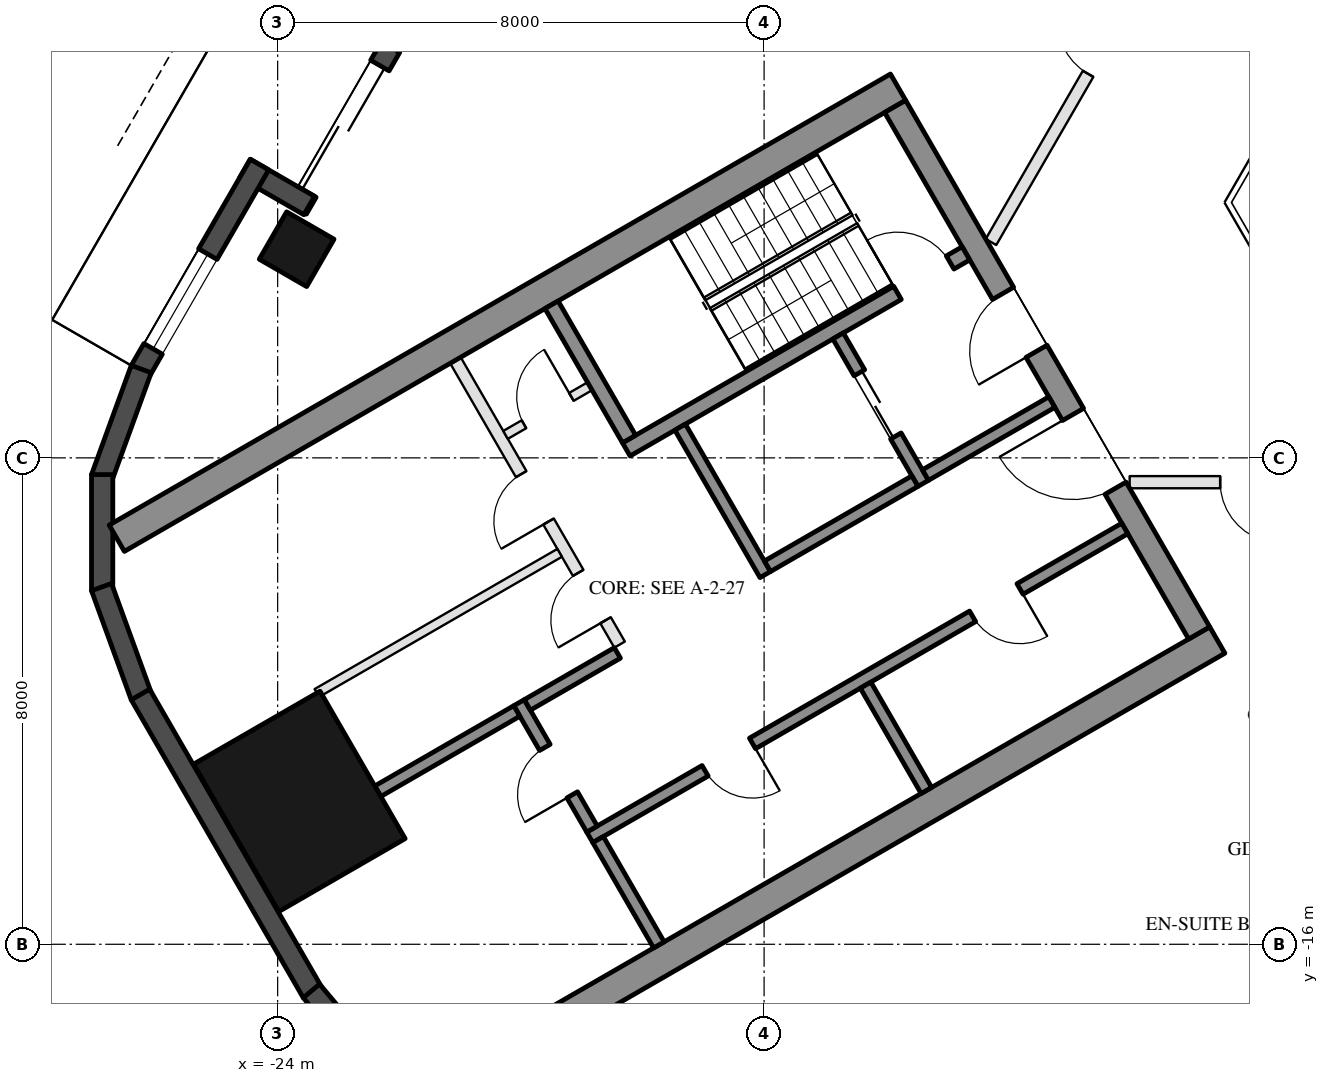
"""IFC4 building model, lengths in metres.
Left out: names, types, materials, properties, quantities, classifications, styles, units other than length and angle.
Written with IfcOpenShell. Run it as: python <this file> out.ifc"""

import sys

from ifc_helpers import new_model, si_unit, direction, frame, frame_2d, origin, origin_2d, place, context, subcontext, project, spatial, rectangle, hollow_rectangle, extrude, element, fill, save


model = new_model("IFC4")
c1 = context("Model", 3, precision=1e-05, world=origin(), true_north=direction((0.0, 1.0)))
c2 = subcontext(c1, "Body", "Model", "MODEL_VIEW")
j1 = project(units=[si_unit("LENGTHUNIT", "METRE"), si_unit("PLANEANGLEUNIT", "RADIAN")], contexts=[c1])
p1 = place(None, origin())
s1 = spatial("IfcSite", under=j1, at=p1, CompositionType="ELEMENT")
p2 = place(p1, origin())
s2 = spatial("IfcBuilding", under=s1, at=p2, CompositionType="ELEMENT")
p3 = place(p2, frame((0.0, 0.0, 120.5)))
s3 = spatial("IfcBuildingStorey", under=s2, at=p3, CompositionType="ELEMENT", Elevation=120.5)
p4 = place(p3, frame((-23.688, -4.568, 0.0), z_axis=(0.0, 0.0, 1.0), x_axis=(0.5, 0.866025403784, 0.0)))
e1 = element("IfcColumn", 1, at=p4, inside=s3, PredefinedType="COLUMN", context=c2, shape_type="SweptSolid", body=[
    extrude(hollow_rectangle(XDim=0.9, YDim=0.9, WallThickness=0.04, at=origin_2d()), origin(), (0.0, 0.0, 1.0), 3.7),
])
p5 = place(p3, frame((-23.643, -13.65, 0.0), z_axis=(0.0, 0.0, 1.0), x_axis=(-0.5, 0.866025403784, 0.0)))
e2 = element("IfcColumn", 2, at=p5, inside=s3, PredefinedType="COLUMN", context=c2, shape_type="SweptSolid", body=[
    extrude(hollow_rectangle(XDim=2.8, YDim=2.4, WallThickness=0.07, at=origin_2d()), origin(), (0.0, 0.0, 1.0), 3.7),
])
p6 = place(p3, frame((-20.309, 1.934, 0.0), z_axis=(0.0, 0.0, 1.0), x_axis=(-0.499992114976, -0.866029956157, 0.0)))
e3 = element("IfcWall", 3, at=p6, inside=s3, PredefinedType="SOLIDWALL", context=c2, shape_type="SweptSolid", body=[
    extrude(rectangle(XDim=6.74, YDim=0.35, at=frame_2d((3.37, 0.0))), origin(), (0.0, 0.0, 1.0), 3.55),
])
p7 = place(p6, frame((4.02, 0.0, 0.0)))
e4 = element("IfcOpeningElement", 4, at=p7, cuts=e3, PredefinedType="OPENING", context=c2, shape_type="SweptSolid", body=[
    extrude(rectangle(XDim=2.4, YDim=2.4, at=frame_2d((1.2, 1.2))), frame((0.0, 0.185, 0.0), z_axis=(0.0, -1.0, 0.0), x_axis=(1.0, 0.0, 0.0)), (0.0, 0.0, 1.0), 0.37),
])
p8 = place(p6, frame((0.77, 0.0, 0.3)))
e5 = element("IfcOpeningElement", 5, at=p8, cuts=e3, PredefinedType="OPENING", context=c2, shape_type="SweptSolid", body=[
    extrude(rectangle(XDim=2.9, YDim=2.65, at=frame_2d((1.45, 1.325))), frame((0.0, 0.185, 0.0), z_axis=(0.0, -1.0, 0.0), x_axis=(1.0, 0.0, 0.0)), (0.0, 0.0, 1.0), 0.37),
])
p9 = place(p3, frame((-23.481, -3.85, 0.0), z_axis=(0.0, 0.0, 1.0), x_axis=(-0.866092288191, 0.499884134912, 0.0)))
e6 = element("IfcWall", 6, at=p9, inside=s3, PredefinedType="SOLIDWALL", context=c2, shape_type="SweptSolid", body=[
    extrude(rectangle(XDim=1.22, YDim=0.35, at=frame_2d((0.61, 0.0))), origin(), (0.0, 0.0, 1.0), 3.55),
])
p10 = place(p3, frame((-24.299, -3.176, 0.0), z_axis=(0.0, 0.0, 1.0), x_axis=(-0.500028278809, -0.866009076391, 0.0)))
e7 = element("IfcWall", 7, at=p10, inside=s3, PredefinedType="SOLIDWALL", context=c2, shape_type="SweptSolid", body=[
    extrude(rectangle(XDim=3.916, YDim=0.35, at=frame_2d((1.958, 0.0))), origin(), (0.0, 0.0, 1.0), 3.55),
])
p11 = place(p10, frame((1.7, 0.0, 0.3)))
e8 = element("IfcOpeningElement", 8, at=p11, cuts=e7, PredefinedType="OPENING", context=c2, shape_type="SweptSolid", body=[
    extrude(rectangle(XDim=1.8, YDim=2.65, at=frame_2d((0.9, 1.325))), frame((0.0, 0.185, 0.0), z_axis=(0.0, -1.0, 0.0), x_axis=(1.0, 0.0, 0.0)), (0.0, 0.0, 1.0), 0.37),
])
for number, where, z_axis, x_axis in (
    (9, (-26.244, -6.54, 0.0), (0.0, 0.0, 1.0), (-0.342, -0.94, 0.0)),
    (10, (-26.886, -8.275, 0.0), (0.0, 0.0, 1.0), (0.0, -1.0, 0.0)),
    (11, (-26.897, -10.125, 0.0), (0.0, 0.0, 1.0), (0.342, -0.94, 0.0)),
):
    element("IfcWall", number, at=place(p3, frame(where, z_axis=z_axis, x_axis=x_axis)), inside=s3, PredefinedType="SOLIDWALL", context=c2, shape_type="SweptSolid", body=[
        extrude(rectangle(XDim=1.91, YDim=0.35, at=frame_2d((0.955, 0.0))), origin(), (0.0, 0.0, 1.0), 3.55),
    ])
p12 = place(p3, frame((-26.257, -11.893, 0.0), z_axis=(0.0, 0.0, 1.0), x_axis=(0.500018773155, -0.866014564827, 0.0)))
e12 = element("IfcWall", 12, at=p12, inside=s3, PredefinedType="SOLIDWALL", context=c2, shape_type="SweptSolid", body=[
    extrude(rectangle(XDim=5.658, YDim=0.35, at=frame_2d((2.829, 0.0))), origin(), (0.0, 0.0, 1.0), 3.55),
])
p13 = place(p3, frame((-23.445, -16.768, 0.0), z_axis=(0.0, 0.0, 1.0), x_axis=(0.642733291068, -0.76609001857, 0.0)))
e13 = element("IfcWall", 13, at=p13, inside=s3, PredefinedType="SOLIDWALL", context=c2, shape_type="SweptSolid", body=[
    extrude(rectangle(XDim=1.91, YDim=0.35, at=frame_2d((0.955, 0.0))), origin(), (0.0, 0.0, 1.0), 3.55),
])
for number, where, z_axis, x_axis in (
    (14, (-13.797, -1.903, 0.0), (0.0, 0.0, 1.0), (-0.866, -0.5, 0.0)),
    (15, (-8.547, -10.997, 0.0), (0.0, 0.0, 1.0), (-0.866, -0.5, 0.0)),
):
    element("IfcWall", number, at=place(p3, frame(where, z_axis=z_axis, x_axis=x_axis)), inside=s3, PredefinedType="SHEAR", context=c2, shape_type="SweptSolid", body=[
        extrude(rectangle(XDim=14.837, YDim=0.5, at=frame_2d((7.418, 0.0))), origin(), (0.0, 0.0, 1.0), 3.5),
    ])
p14 = place(p3, frame((-13.845, -2.22, 0.0), z_axis=(0.0, 0.0, 1.0), x_axis=(0.500004234368, -0.866022959057, 0.0)))
e16 = element("IfcWall", 16, at=p14, inside=s3, PredefinedType="SHEAR", context=c2, shape_type="SweptSolid", body=[
    extrude(rectangle(XDim=10.0, YDim=0.4, at=frame_2d((5.0, 0.0))), origin(), (0.0, 0.0, 1.0), 3.5),
])
p15 = place(p14, frame((3.55, 0.0, 0.0)))
e17 = element("IfcOpeningElement", 17, at=p15, cuts=e16, PredefinedType="OPENING", context=c2, shape_type="SweptSolid", body=[
    extrude(rectangle(XDim=1.1, YDim=2.1, at=frame_2d((0.55, 1.05))), frame((0.0, 0.21, 0.0), z_axis=(0.0, -1.0, 0.0), x_axis=(1.0, 0.0, 0.0)), (0.0, 0.0, 1.0), 0.42),
])
p16 = place(p14, frame((5.85, 0.0, 0.0)))
e18 = element("IfcOpeningElement", 18, at=p16, cuts=e16, PredefinedType="OPENING", context=c2, shape_type="SweptSolid", body=[
    extrude(rectangle(XDim=1.4, YDim=2.1, at=frame_2d((0.7, 1.05))), frame((0.0, 0.21, 0.0), z_axis=(0.0, -1.0, 0.0), x_axis=(1.0, 0.0, 0.0)), (0.0, 0.0, 1.0), 0.42),
])
p17 = place(p3, frame((-12.681, -4.636, 0.0), z_axis=(0.0, 0.0, 1.0), x_axis=(-0.866021702275, -0.500006411147, 0.0)))
e19 = element("IfcWall", 19, at=p17, inside=s3, PredefinedType="SHEAR", context=c2, shape_type="SweptSolid", body=[
    extrude(rectangle(XDim=6.45, YDim=0.25, at=frame_2d((3.225, 0.0))), origin(), (0.0, 0.0, 1.0), 3.5),
])
p18 = place(p17, frame((0.3, 0.0, 0.0)))
e20 = element("IfcOpeningElement", 20, at=p18, cuts=e19, PredefinedType="OPENING", context=c2, shape_type="SweptSolid", body=[
    extrude(rectangle(XDim=1.0, YDim=2.1, at=frame_2d((0.5, 1.05))), frame((0.0, 0.135, 0.0), z_axis=(0.0, -1.0, 0.0), x_axis=(1.0, 0.0, 0.0)), (0.0, 0.0, 1.0), 0.27),
])
p19 = place(p3, frame((-19.496, -5.482, 0.0), z_axis=(0.0, 0.0, 1.0), x_axis=(0.499990435942, -0.866030925526, 0.0)))
e21 = element("IfcWall", 21, at=p19, inside=s3, PredefinedType="SHEAR", context=c2, shape_type="SweptSolid", body=[
    extrude(rectangle(XDim=2.55, YDim=0.25, at=frame_2d((1.275, 0.0))), origin(), (0.0, 0.0, 1.0), 3.5),
])
p20 = place(p3, frame((-17.381, -7.495, 0.0), z_axis=(0.0, 0.0, 1.0), x_axis=(0.500011755427, -0.866018616679, 0.0)))
e22 = element("IfcWall", 22, at=p20, inside=s3, PredefinedType="SHEAR", context=c2, shape_type="SweptSolid", body=[
    extrude(rectangle(XDim=2.8, YDim=0.2, at=frame_2d((1.4, 0.0))), origin(), (0.0, 0.0, 1.0), 3.5),
])
p21 = place(p3, frame((-14.783, -5.995, 0.0), z_axis=(0.0, 0.0, 1.0), x_axis=(0.49994636267, -0.866056369097, 0.0)))
e23 = element("IfcWall", 23, at=p21, inside=s3, PredefinedType="SHEAR", context=c2, shape_type="SweptSolid", body=[
    extrude(rectangle(XDim=2.8, YDim=0.2, at=frame_2d((1.4, 0.0))), origin(), (0.0, 0.0, 1.0), 3.5),
])
p22 = place(p21, frame((0.7, 0.0, 0.0)))
e24 = element("IfcOpeningElement", 24, at=p22, cuts=e23, PredefinedType="OPENING", context=c2, shape_type="SweptSolid", body=[
    extrude(rectangle(XDim=1.2, YDim=2.1, at=frame_2d((0.6, 1.05))), frame((0.0, 0.11, 0.0), z_axis=(0.0, -1.0, 0.0), x_axis=(1.0, 0.0, 0.0)), (0.0, 0.0, 1.0), 0.22),
])
p23 = place(p3, frame((-13.52, -8.383, 0.0), z_axis=(0.0, 0.0, 1.0), x_axis=(-0.866034573852, -0.49998411664, 0.0)))
e25 = element("IfcWall", 25, at=p23, inside=s3, PredefinedType="SHEAR", context=c2, shape_type="SweptSolid", body=[
    extrude(rectangle(XDim=2.8, YDim=0.2, at=frame_2d((1.4, 0.0))), origin(), (0.0, 0.0, 1.0), 3.5),
])
p24 = place(p3, frame((-11.268, -7.083, 0.0), z_axis=(0.0, 0.0, 1.0), x_axis=(-0.866050077142, -0.499957262057, 0.0)))
e26 = element("IfcWall", 26, at=p24, inside=s3, PredefinedType="SHEAR", context=c2, shape_type="SweptSolid", body=[
    extrude(rectangle(XDim=2.4, YDim=0.2, at=frame_2d((1.2, 0.0))), origin(), (0.0, 0.0, 1.0), 3.5),
])
p25 = place(p3, frame((-10.068, -9.162, 0.0), z_axis=(0.0, 0.0, 1.0), x_axis=(-0.866032725843, -0.499987317609, 0.0)))
e27 = element("IfcWall", 27, at=p25, inside=s3, PredefinedType="SHEAR", context=c2, shape_type="SweptSolid", body=[
    extrude(rectangle(XDim=10.16, YDim=0.2, at=frame_2d((5.08, 0.0))), origin(), (0.0, 0.0, 1.0), 3.5),
])
p26 = place(p25, frame((1.99, 0.0, 0.0)))
e28 = element("IfcOpeningElement", 28, at=p26, cuts=e27, PredefinedType="OPENING", context=c2, shape_type="SweptSolid", body=[
    extrude(rectangle(XDim=0.9, YDim=2.1, at=frame_2d((0.45, 1.05))), frame((0.0, 0.11, 0.0), z_axis=(0.0, -1.0, 0.0), x_axis=(1.0, 0.0, 0.0)), (0.0, 0.0, 1.0), 0.22),
])
p27 = place(p25, frame((7.07, 0.0, 0.0)))
e29 = element("IfcOpeningElement", 29, at=p27, cuts=e27, PredefinedType="OPENING", context=c2, shape_type="SweptSolid", body=[
    extrude(rectangle(XDim=0.9, YDim=2.1, at=frame_2d((0.45, 1.05))), frame((0.0, 0.11, 0.0), z_axis=(0.0, -1.0, 0.0), x_axis=(1.0, 0.0, 0.0)), (0.0, 0.0, 1.0), 0.22),
])
p28 = place(p3, frame((-20.031, -12.026, 0.0), z_axis=(0.0, 0.0, 1.0), x_axis=(0.500033551112, -0.866006032174, 0.0)))
e30 = element("IfcWall", 30, at=p28, inside=s3, PredefinedType="SHEAR", context=c2, shape_type="SweptSolid", body=[
    extrude(rectangle(XDim=2.4, YDim=0.2, at=frame_2d((1.2, 0.0))), origin(), (0.0, 0.0, 1.0), 3.5),
])
p29 = place(p28, frame((0.85, 0.0, 0.0)))
e31 = element("IfcOpeningElement", 31, at=p29, cuts=e30, PredefinedType="OPENING", context=c2, shape_type="SweptSolid", body=[
    extrude(rectangle(XDim=0.9, YDim=2.1, at=frame_2d((0.45, 1.05))), frame((0.0, 0.11, 0.0), z_axis=(0.0, -1.0, 0.0), x_axis=(1.0, 0.0, 0.0)), (0.0, 0.0, 1.0), 0.22),
])
p30 = place(p3, frame((-18.413, -11.208, 0.0), z_axis=(0.0, 0.0, 1.0), x_axis=(-0.866038183914, -0.499977863513, 0.0)))
e32 = element("IfcWall", 32, at=p30, inside=s3, PredefinedType="SHEAR", context=c2, shape_type="SweptSolid", body=[
    extrude(rectangle(XDim=1.71, YDim=0.2, at=frame_2d((0.855, 0.0))), origin(), (0.0, 0.0, 1.0), 3.5),
])
for number, where, z_axis, x_axis in (
    (33, (-14.331, -11.738, 0.0), (0.0, 0.0, 1.0), (0.5, -0.866, 0.0)),
    (34, (-18.73, -14.278, 0.0), (0.0, 0.0, 1.0), (0.5, -0.866, 0.0)),
):
    element("IfcWall", number, at=place(p3, frame(where, z_axis=z_axis, x_axis=x_axis)), inside=s3, PredefinedType="SHEAR", context=c2, shape_type="SweptSolid", body=[
        extrude(rectangle(XDim=2.0, YDim=0.2, at=frame_2d((1.0, 0.0))), origin(), (0.0, 0.0, 1.0), 3.5),
    ])
p31 = place(p3, frame((-20.067, -12.163, 0.0), z_axis=(0.0, 0.0, 1.0), x_axis=(-0.866060851709, -0.499938597367, 0.0)))
e35 = element("IfcWall", 35, at=p31, inside=s3, PredefinedType="SHEAR", context=c2, shape_type="SweptSolid", body=[
    extrude(rectangle(XDim=2.64, YDim=0.2, at=frame_2d((1.32, 0.0))), origin(), (0.0, 0.0, 1.0), 3.5),
])
p32 = place(p3, frame((-21.076, -6.395, 0.0), z_axis=(0.0, 0.0, 1.0), x_axis=(0.50001468107, -0.866016927499, 0.0)))
e36 = element("IfcWall", 36, at=p32, inside=s3, PredefinedType="PARTITIONING", context=c2, shape_type="SweptSolid", body=[
    extrude(rectangle(XDim=5.4, YDim=0.2, at=frame_2d((2.7, 0.0))), origin(), (0.0, 0.0, 1.0), 3.5),
])
p33 = place(p32, frame((2.163, 0.0, 0.0)))
e37 = element("IfcOpeningElement", 37, at=p33, cuts=e36, PredefinedType="OPENING", context=c2, shape_type="SweptSolid", body=[
    extrude(rectangle(XDim=0.9, YDim=2.1, at=frame_2d((0.45, 1.05))), frame((0.0, 0.11, 0.0), z_axis=(0.0, -1.0, 0.0), x_axis=(1.0, 0.0, 0.0)), (0.0, 0.0, 1.0), 0.22),
])
p34 = place(p32, frame((4.038, 0.0, 0.0)))
e38 = element("IfcOpeningElement", 38, at=p34, cuts=e36, PredefinedType="OPENING", context=c2, shape_type="SweptSolid", body=[
    extrude(rectangle(XDim=0.9, YDim=2.1, at=frame_2d((0.45, 1.05))), frame((0.0, 0.11, 0.0), z_axis=(0.0, -1.0, 0.0), x_axis=(1.0, 0.0, 0.0)), (0.0, 0.0, 1.0), 0.22),
])
p35 = place(p3, frame((-18.866, -6.822, 0.0), z_axis=(0.0, 0.0, 1.0), x_axis=(-0.866028054938, -0.499995408039, 0.0)))
e39 = element("IfcWall", 39, at=p35, inside=s3, PredefinedType="PARTITIONING", context=c2, shape_type="SweptSolid", body=[
    extrude(rectangle(XDim=1.6, YDim=0.15, at=frame_2d((0.8, 0.0))), origin(), (0.0, 0.0, 1.0), 3.5),
])
p36 = place(p35, frame((0.35, 0.0, 0.0)))
e40 = element("IfcOpeningElement", 40, at=p36, cuts=e39, PredefinedType="OPENING", context=c2, shape_type="SweptSolid", body=[
    extrude(rectangle(XDim=0.9, YDim=2.1, at=frame_2d((0.45, 1.05))), frame((0.0, 0.085, 0.0), z_axis=(0.0, -1.0, 0.0), x_axis=(1.0, 0.0, 0.0)), (0.0, 0.0, 1.0), 0.17),
])
p37 = place(p3, frame((-19.363, -9.562, 0.0), z_axis=(0.0, 0.0, 1.0), x_axis=(-0.86601185002, -0.500023475074, 0.0)))
e41 = element("IfcWall", 41, at=p37, inside=s3, PredefinedType="PARTITIONING", context=c2, shape_type="SweptSolid", body=[
    extrude(rectangle(XDim=4.61, YDim=0.15, at=frame_2d((2.305, 0.0))), origin(), (0.0, 0.0, 1.0), 3.5),
])
p38 = place(p3, frame((-6.011, -8.4, 0.0), z_axis=(0.0, 0.0, 1.0), x_axis=(-1.0, 0.0, 0.0)))
e42 = element("IfcWall", 42, at=p38, inside=s3, PredefinedType="PARTITIONING", context=c2, shape_type="SweptSolid", body=[
    extrude(rectangle(XDim=3.977, YDim=0.2, at=frame_2d((1.988, 0.0))), origin(), (0.0, 0.0, 1.0), 2.95),
])
p39 = place(p38, frame((1.488, 0.0, 0.0)))
e43 = element("IfcOpeningElement", 43, at=p39, cuts=e42, PredefinedType="OPENING", context=c2, shape_type="SweptSolid", body=[
    extrude(rectangle(XDim=1.0, YDim=2.1, at=frame_2d((0.5, 1.05))), frame((0.0, 0.11, 0.0), z_axis=(0.0, -1.0, 0.0), x_axis=(1.0, 0.0, 0.0)), (0.0, 0.0, 1.0), 0.22),
])
p40 = place(p3, frame((-12.269, -4.45, 0.0), z_axis=(0.0, 0.0, 1.0), x_axis=(0.500009454961, 0.866019944892, 0.0)))
e44 = element("IfcWall", 44, at=p40, inside=s3, PredefinedType="PARTITIONING", context=c2, shape_type="SweptSolid", body=[
    extrude(rectangle(XDim=7.388, YDim=0.2, at=frame_2d((3.694, 0.0))), origin(), (0.0, 0.0, 1.0), 2.95),
])
p41 = place(p40, frame((3.194, 0.0, 0.0)))
e45 = element("IfcOpeningElement", 45, at=p41, cuts=e44, PredefinedType="OPENING", context=c2, shape_type="SweptSolid", body=[
    extrude(rectangle(XDim=1.0, YDim=2.1, at=frame_2d((0.5, 1.05))), frame((0.0, 0.11, 0.0), z_axis=(0.0, -1.0, 0.0), x_axis=(1.0, 0.0, 0.0)), (0.0, 0.0, 1.0), 0.22),
])
p42 = place(p7, frame((2.4, 0.0, 0.0), z_axis=(0.0, 0.0, 1.0), x_axis=(-1.0, 0.0, 0.0)))
e46 = element("IfcDoor", 46, at=p42, inside=s3, OperationType="SLIDING_TO_LEFT", PredefinedType="DOOR", context=c2, shape_type="SweptSolid", body=[
    extrude(rectangle(XDim=2.4, YDim=2.4, at=frame_2d((1.2, 1.2))), frame((0.0, 0.025, 0.0), z_axis=(0.0, -1.0, 0.0), x_axis=(1.0, 0.0, 0.0)), (0.0, 0.0, 1.0), 0.05),
])
fill(e4, e46)
p43 = place(p11, origin())
e47 = element("IfcWindow", 47, at=p43, inside=s3, PartitioningType="SINGLE_PANEL", PredefinedType="WINDOW", context=c2, shape_type="SweptSolid", body=[
    extrude(rectangle(XDim=1.8, YDim=2.65, at=frame_2d((0.9, 1.325))), frame((0.0, 0.03, 0.0), z_axis=(0.0, -1.0, 0.0), x_axis=(1.0, 0.0, 0.0)), (0.0, 0.0, 1.0), 0.06),
])
fill(e8, e47)
p44 = place(p22, origin())
e48 = element("IfcDoor", 48, at=p44, inside=s3, OperationType="DOUBLE_DOOR_SLIDING", PredefinedType="DOOR", context=c2, shape_type="SweptSolid", body=[
    extrude(rectangle(XDim=1.2, YDim=2.1, at=frame_2d((0.6, 1.05))), frame((0.0, 0.025, 0.0), z_axis=(0.0, -1.0, 0.0), x_axis=(1.0, 0.0, 0.0)), (0.0, 0.0, 1.0), 0.05),
])
fill(e24, e48)
p45 = place(p36, frame((0.9, 0.0, 0.0), z_axis=(0.0, 0.0, 1.0), x_axis=(-1.0, 0.0, 0.0)))
e49 = element("IfcDoor", 49, at=p45, inside=s3, OperationType="SINGLE_SWING_RIGHT", PredefinedType="DOOR", context=c2, shape_type="SweptSolid", body=[
    extrude(rectangle(XDim=0.9, YDim=2.1, at=frame_2d((0.45, 1.05))), frame((0.0, 0.025, 0.0), z_axis=(0.0, -1.0, 0.0), x_axis=(1.0, 0.0, 0.0)), (0.0, 0.0, 1.0), 0.05),
])
fill(e40, e49)
p46 = place(p26, origin())
e50 = element("IfcDoor", 50, at=p46, inside=s3, OperationType="SINGLE_SWING_LEFT", PredefinedType="DOOR", context=c2, shape_type="SweptSolid", body=[
    extrude(rectangle(XDim=0.9, YDim=2.1, at=frame_2d((0.45, 1.05))), frame((0.0, 0.025, 0.0), z_axis=(0.0, -1.0, 0.0), x_axis=(1.0, 0.0, 0.0)), (0.0, 0.0, 1.0), 0.05),
])
fill(e28, e50)
p47 = place(p27, origin())
e51 = element("IfcDoor", 51, at=p47, inside=s3, OperationType="SINGLE_SWING_LEFT", PredefinedType="DOOR", context=c2, shape_type="SweptSolid", body=[
    extrude(rectangle(XDim=0.9, YDim=2.1, at=frame_2d((0.45, 1.05))), frame((0.0, 0.025, 0.0), z_axis=(0.0, -1.0, 0.0), x_axis=(1.0, 0.0, 0.0)), (0.0, 0.0, 1.0), 0.05),
])
fill(e29, e51)
p48 = place(p29, frame((0.9, 0.0, 0.0), z_axis=(0.0, 0.0, 1.0), x_axis=(-1.0, 0.0, 0.0)))
e52 = element("IfcDoor", 52, at=p48, inside=s3, OperationType="SINGLE_SWING_LEFT", PredefinedType="DOOR", context=c2, shape_type="SweptSolid", body=[
    extrude(rectangle(XDim=0.9, YDim=2.1, at=frame_2d((0.45, 1.05))), frame((0.0, 0.025, 0.0), z_axis=(0.0, -1.0, 0.0), x_axis=(1.0, 0.0, 0.0)), (0.0, 0.0, 1.0), 0.05),
])
fill(e31, e52)
p49 = place(p33, frame((0.9, 0.0, 0.0), z_axis=(0.0, 0.0, 1.0), x_axis=(-1.0, 0.0, 0.0)))
e53 = element("IfcDoor", 53, at=p49, inside=s3, OperationType="SINGLE_SWING_LEFT", PredefinedType="DOOR", context=c2, shape_type="SweptSolid", body=[
    extrude(rectangle(XDim=0.9, YDim=2.1, at=frame_2d((0.45, 1.05))), frame((0.0, 0.025, 0.0), z_axis=(0.0, -1.0, 0.0), x_axis=(1.0, 0.0, 0.0)), (0.0, 0.0, 1.0), 0.05),
])
fill(e37, e53)
p50 = place(p34, frame((0.9, 0.0, 0.0), z_axis=(0.0, 0.0, 1.0), x_axis=(-1.0, 0.0, 0.0)))
e54 = element("IfcDoor", 54, at=p50, inside=s3, OperationType="SINGLE_SWING_LEFT", PredefinedType="DOOR", context=c2, shape_type="SweptSolid", body=[
    extrude(rectangle(XDim=0.9, YDim=2.1, at=frame_2d((0.45, 1.05))), frame((0.0, 0.025, 0.0), z_axis=(0.0, -1.0, 0.0), x_axis=(1.0, 0.0, 0.0)), (0.0, 0.0, 1.0), 0.05),
])
fill(e38, e54)
p51 = place(p15, frame((1.1, 0.0, 0.0), z_axis=(0.0, 0.0, 1.0), x_axis=(-1.0, 0.0, 0.0)))
e55 = element("IfcDoor", 55, at=p51, inside=s3, OperationType="SINGLE_SWING_LEFT", PredefinedType="DOOR", context=c2, shape_type="SweptSolid", body=[
    extrude(rectangle(XDim=1.1, YDim=2.1, at=frame_2d((0.55, 1.05))), frame((0.0, 0.025, 0.0), z_axis=(0.0, -1.0, 0.0), x_axis=(1.0, 0.0, 0.0)), (0.0, 0.0, 1.0), 0.05),
])
fill(e17, e55)
p52 = place(p16, frame((1.4, 0.0, 0.0), z_axis=(0.0, 0.0, 1.0), x_axis=(-1.0, 0.0, 0.0)))
e56 = element("IfcDoor", 56, at=p52, inside=s3, OperationType="DOUBLE_DOOR_SINGLE_SWING", PredefinedType="DOOR", context=c2, shape_type="SweptSolid", body=[
    extrude(rectangle(XDim=1.4, YDim=2.1, at=frame_2d((0.7, 1.05))), frame((0.0, 0.025, 0.0), z_axis=(0.0, -1.0, 0.0), x_axis=(1.0, 0.0, 0.0)), (0.0, 0.0, 1.0), 0.05),
])
fill(e18, e56)
p53 = place(p18, frame((1.0, 0.0, 0.0), z_axis=(0.0, 0.0, 1.0), x_axis=(-1.0, 0.0, 0.0)))
e57 = element("IfcDoor", 57, at=p53, inside=s3, OperationType="SINGLE_SWING_LEFT", PredefinedType="DOOR", context=c2, shape_type="SweptSolid", body=[
    extrude(rectangle(XDim=1.0, YDim=2.1, at=frame_2d((0.5, 1.05))), frame((0.0, 0.025, 0.0), z_axis=(0.0, -1.0, 0.0), x_axis=(1.0, 0.0, 0.0)), (0.0, 0.0, 1.0), 0.05),
])
fill(e20, e57)
p54 = place(p39, origin())
e58 = element("IfcDoor", 58, at=p54, inside=s3, OperationType="SINGLE_SWING_LEFT", PredefinedType="DOOR", context=c2, shape_type="SweptSolid", body=[
    extrude(rectangle(XDim=1.0, YDim=2.1, at=frame_2d((0.5, 1.05))), frame((0.0, 0.025, 0.0), z_axis=(0.0, -1.0, 0.0), x_axis=(1.0, 0.0, 0.0)), (0.0, 0.0, 1.0), 0.05),
])
fill(e43, e58)
p55 = place(p41, origin())
e59 = element("IfcDoor", 59, at=p55, inside=s3, OperationType="SINGLE_SWING_RIGHT", PredefinedType="DOOR", context=c2, shape_type="SweptSolid", body=[
    extrude(rectangle(XDim=1.0, YDim=2.1, at=frame_2d((0.5, 1.05))), frame((0.0, 0.025, 0.0), z_axis=(0.0, -1.0, 0.0), x_axis=(1.0, 0.0, 0.0)), (0.0, 0.0, 1.0), 0.05),
])
fill(e45, e59)
save(model, sys.argv[1])
